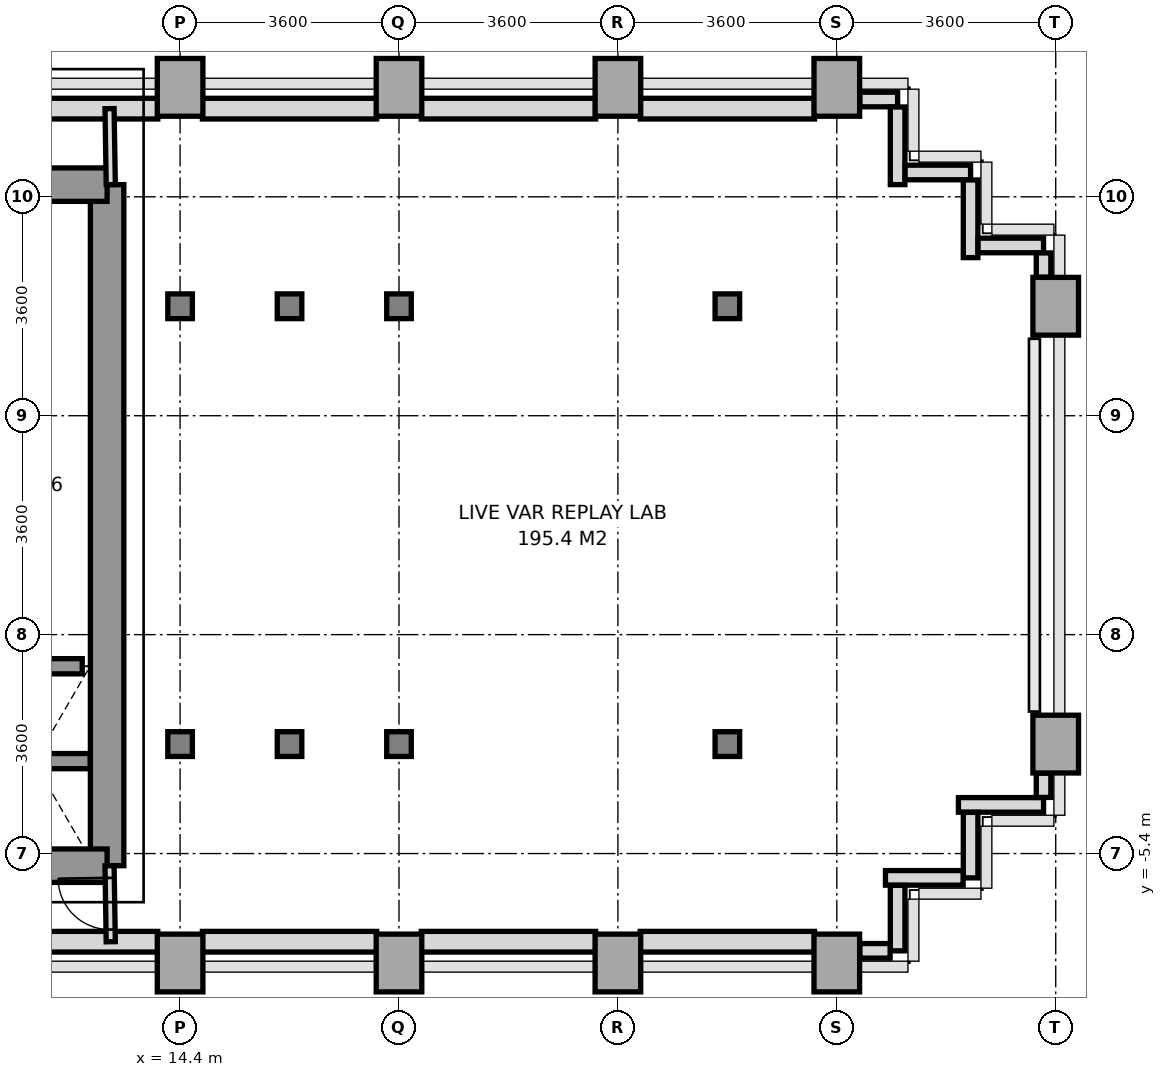
"""IFC4 building model, lengths in metres.
Left out: names, types, materials, properties, quantities, classifications, styles, units other than length and angle.
Written with IfcOpenShell. Run it as: python <this file> out.ifc"""

import sys

from ifc_helpers import new_model, si_unit, direction, frame, frame_2d, origin, origin_2d, place, context, subcontext, project, spatial, rectangle, i_section, extrude, source, transform, mapped, element, fill, save


model = new_model("IFC4")
c1 = context("Model", 3, precision=1e-05, world=origin(), true_north=direction((0.0, 1.0)))
c2 = subcontext(c1, "Body", "Model", "MODEL_VIEW")
j1 = project(units=[si_unit("LENGTHUNIT", "METRE"), si_unit("PLANEANGLEUNIT", "RADIAN")], contexts=[c1])
p1 = place(None, origin())
s1 = spatial("IfcSite", under=j1, at=p1, CompositionType="ELEMENT")
p2 = place(p1, origin())
s2 = spatial("IfcBuilding", under=s1, at=p2, CompositionType="ELEMENT")
p3 = place(p2, frame((0.0, 0.0, 74.8)))
s3 = spatial("IfcBuildingStorey", under=s2, at=p3, CompositionType="ELEMENT", Elevation=74.8)
m1 = source(origin(), c2, "Body", "SweptSolid", [
    extrude(rectangle(XDim=0.75, YDim=0.95, at=origin_2d()), origin(), (0.0, 0.0, 1.0), 3.2),
])
p4 = place(p3, frame((14.4, -7.2, 0.0), z_axis=(0.0, 0.0, 1.0), x_axis=(1.0, 0.0, 0.0)))
e1 = element("IfcColumn", 1, at=p4, inside=s3, PredefinedType="COLUMN", context=c2, shape_type="MappedRepresentation", body=[
    mapped(m1, transform((0.0, 0.0, 0.0), x_axis=(1.0, 0.0, 0.0), y_axis=(0.0, 1.0, 0.0), z_axis=(0.0, 0.0, 1.0), scale=1.0)),
])
m2 = source(origin(), c2, "Body", "SweptSolid", [
    extrude(i_section(OverallWidth=0.404, OverallDepth=0.407, WebThickness=0.022, FlangeThickness=0.035, at=origin_2d()), origin(), (0.0, 0.0, 1.0), 3.2),
])
for number, where, z_axis, x_axis in (
    (2, (14.4, -3.6, 0.0), (0.0, 0.0, 1.0), (1.0, 0.0, 0.0)),
    (3, (14.4, 3.6, 0.0), (0.0, 0.0, 1.0), (1.0, 0.0, 0.0)),
):
    element("IfcColumn", number, at=place(p3, frame(where, z_axis=z_axis, x_axis=x_axis)), inside=s3, PredefinedType="COLUMN", context=c2, shape_type="MappedRepresentation", body=[
        mapped(m2, transform((0.0, 0.0, 0.0), x_axis=(1.0, 0.0, 0.0), y_axis=(0.0, 1.0, 0.0), z_axis=(0.0, 0.0, 1.0), scale=1.0)),
    ])
p5 = place(p3, frame((14.4, 7.2, 0.0), z_axis=(0.0, 0.0, 1.0), x_axis=(1.0, 0.0, 0.0)))
e4 = element("IfcColumn", 4, at=p5, inside=s3, PredefinedType="COLUMN", context=c2, shape_type="MappedRepresentation", body=[
    mapped(m1, transform((0.0, 0.0, 0.0), x_axis=(1.0, 0.0, 0.0), y_axis=(0.0, 1.0, 0.0), z_axis=(0.0, 0.0, 1.0), scale=1.0)),
])
for number, where, z_axis, x_axis in (
    (5, (16.2, -3.6, 0.0), (0.0, 0.0, 1.0), (1.0, 0.0, 0.0)),
    (6, (16.2, 3.6, 0.0), (0.0, 0.0, 1.0), (1.0, 0.0, 0.0)),
):
    element("IfcColumn", number, at=place(p3, frame(where, z_axis=z_axis, x_axis=x_axis)), inside=s3, PredefinedType="COLUMN", context=c2, shape_type="MappedRepresentation", body=[
        mapped(m2, transform((0.0, 0.0, 0.0), x_axis=(1.0, 0.0, 0.0), y_axis=(0.0, 1.0, 0.0), z_axis=(0.0, 0.0, 1.0), scale=1.0)),
    ])
p6 = place(p3, frame((18.0, -7.2, 0.0), z_axis=(0.0, 0.0, 1.0), x_axis=(1.0, 0.0, 0.0)))
e7 = element("IfcColumn", 7, at=p6, inside=s3, PredefinedType="COLUMN", context=c2, shape_type="MappedRepresentation", body=[
    mapped(m1, transform((0.0, 0.0, 0.0), x_axis=(1.0, 0.0, 0.0), y_axis=(0.0, 1.0, 0.0), z_axis=(0.0, 0.0, 1.0), scale=1.0)),
])
for number, where, z_axis, x_axis in (
    (8, (18.0, -3.6, 0.0), (0.0, 0.0, 1.0), (1.0, 0.0, 0.0)),
    (9, (18.0, 3.6, 0.0), (0.0, 0.0, 1.0), (1.0, 0.0, 0.0)),
):
    element("IfcColumn", number, at=place(p3, frame(where, z_axis=z_axis, x_axis=x_axis)), inside=s3, PredefinedType="COLUMN", context=c2, shape_type="MappedRepresentation", body=[
        mapped(m2, transform((0.0, 0.0, 0.0), x_axis=(1.0, 0.0, 0.0), y_axis=(0.0, 1.0, 0.0), z_axis=(0.0, 0.0, 1.0), scale=1.0)),
    ])
for number, where, z_axis, x_axis in (
    (10, (18.0, 7.2, 0.0), (0.0, 0.0, 1.0), (1.0, 0.0, 0.0)),
    (11, (21.6, -7.2, 0.0), (0.0, 0.0, 1.0), (1.0, 0.0, 0.0)),
    (12, (21.6, 7.2, 0.0), (0.0, 0.0, 1.0), (1.0, 0.0, 0.0)),
):
    element("IfcColumn", number, at=place(p3, frame(where, z_axis=z_axis, x_axis=x_axis)), inside=s3, PredefinedType="COLUMN", context=c2, shape_type="MappedRepresentation", body=[
        mapped(m1, transform((0.0, 0.0, 0.0), x_axis=(1.0, 0.0, 0.0), y_axis=(0.0, 1.0, 0.0), z_axis=(0.0, 0.0, 1.0), scale=1.0)),
    ])
for number, where, z_axis, x_axis in (
    (13, (23.4, -3.6, 0.0), (0.0, 0.0, 1.0), (1.0, 0.0, 0.0)),
    (14, (23.4, 3.6, 0.0), (0.0, 0.0, 1.0), (1.0, 0.0, 0.0)),
):
    element("IfcColumn", number, at=place(p3, frame(where, z_axis=z_axis, x_axis=x_axis)), inside=s3, PredefinedType="COLUMN", context=c2, shape_type="MappedRepresentation", body=[
        mapped(m2, transform((0.0, 0.0, 0.0), x_axis=(1.0, 0.0, 0.0), y_axis=(0.0, 1.0, 0.0), z_axis=(0.0, 0.0, 1.0), scale=1.0)),
    ])
for number, where, z_axis, x_axis in (
    (15, (25.2, -7.2, 0.0), (0.0, 0.0, 1.0), (1.0, 0.0, 0.0)),
    (16, (25.2, 7.2, 0.0), (0.0, 0.0, 1.0), (1.0, 0.0, 0.0)),
    (17, (28.8, -3.6, 0.0), (0.0, 0.0, 1.0), (1.0, 0.0, 0.0)),
    (18, (28.8, 3.6, 0.0), (0.0, 0.0, 1.0), (1.0, 0.0, 0.0)),
):
    element("IfcColumn", number, at=place(p3, frame(where, z_axis=z_axis, x_axis=x_axis)), inside=s3, PredefinedType="COLUMN", context=c2, shape_type="MappedRepresentation", body=[
        mapped(m1, transform((0.0, 0.0, 0.0), x_axis=(1.0, 0.0, 0.0), y_axis=(0.0, 1.0, 0.0), z_axis=(0.0, 0.0, 1.0), scale=1.0)),
    ])
p7 = place(p3, frame((11.498, 6.85, 0.0), z_axis=(0.0, 0.0, 1.0), x_axis=(1.0, 0.0, 0.0)))
e19 = element("IfcWall", 19, at=p7, inside=s3, PredefinedType="SOLIDWALL", context=c2, shape_type="SweptSolid", body=[
    extrude(rectangle(XDim=2.535, YDim=0.34, at=frame_2d((1.268, 0.0))), origin(), (0.0, 0.0, 1.0), 3.2),
])
for number, where, z_axis, x_axis in (
    (20, (14.767, 6.85, 0.0), (0.0, 0.0, 1.0), (1.0, 0.0, 0.0)),
    (21, (18.367, 6.85, 0.0), (0.0, 0.0, 1.0), (1.0, 0.0, 0.0)),
    (22, (21.967, 6.85, 0.0), (0.0, 0.0, 1.0), (1.0, 0.0, 0.0)),
):
    element("IfcWall", number, at=place(p3, frame(where, z_axis=z_axis, x_axis=x_axis)), inside=s3, PredefinedType="SOLIDWALL", context=c2, shape_type="SweptSolid", body=[
        extrude(rectangle(XDim=2.866, YDim=0.34, at=frame_2d((1.433, 0.0))), origin(), (0.0, 0.0, 1.0), 2.45),
    ])
p8 = place(p3, frame((11.75, -6.85, 0.0), z_axis=(0.0, 0.0, 1.0), x_axis=(1.0, 0.0, 0.0)))
e23 = element("IfcWall", 23, at=p8, inside=s3, PredefinedType="SOLIDWALL", context=c2, shape_type="SweptSolid", body=[
    extrude(rectangle(XDim=2.283, YDim=0.34, at=frame_2d((1.142, 0.0))), origin(), (0.0, 0.0, 1.0), 3.2),
])
for number, where, z_axis, x_axis in (
    (24, (14.767, -6.85, 0.0), (0.0, 0.0, 1.0), (1.0, 0.0, 0.0)),
    (25, (18.367, -6.85, 0.0), (0.0, 0.0, 1.0), (1.0, 0.0, 0.0)),
    (26, (21.967, -6.85, 0.0), (0.0, 0.0, 1.0), (1.0, 0.0, 0.0)),
):
    element("IfcWall", number, at=place(p3, frame(where, z_axis=z_axis, x_axis=x_axis)), inside=s3, PredefinedType="SOLIDWALL", context=c2, shape_type="SweptSolid", body=[
        extrude(rectangle(XDim=2.866, YDim=0.34, at=frame_2d((1.433, 0.0))), origin(), (0.0, 0.0, 1.0), 2.45),
    ])
p9 = place(p3, frame((28.6, -4.6, 0.0), z_axis=(0.0, 0.0, 1.0), x_axis=(-1.0, 0.0, 0.0)))
e27 = element("IfcWall", 27, at=p9, inside=s3, PredefinedType="PARAPET", context=c2, shape_type="SweptSolid", body=[
    extrude(rectangle(XDim=1.4, YDim=0.24, at=frame_2d((0.7, 0.0))), origin(), (0.0, 0.0, 1.0), 1.15),
])
p10 = place(p3, frame((27.4, -4.723, 0.0), z_axis=(0.0, 0.0, 1.0), x_axis=(0.0, -1.0, 0.0)))
e28 = element("IfcWall", 28, at=p10, inside=s3, PredefinedType="PARAPET", context=c2, shape_type="SweptSolid", body=[
    extrude(rectangle(XDim=1.077, YDim=0.24, at=frame_2d((0.539, 0.0))), origin(), (0.0, 0.0, 1.0), 1.15),
])
p11 = place(p3, frame((27.277, -5.8, 0.0), z_axis=(0.0, 0.0, 1.0), x_axis=(-1.0, 0.0, 0.0)))
e29 = element("IfcWall", 29, at=p11, inside=s3, PredefinedType="PARAPET", context=c2, shape_type="SweptSolid", body=[
    extrude(rectangle(XDim=1.277, YDim=0.24, at=frame_2d((0.639, 0.0))), origin(), (0.0, 0.0, 1.0), 1.15),
])
p12 = place(p3, frame((26.2, -5.923, 0.0), z_axis=(0.0, 0.0, 1.0), x_axis=(0.0, -1.0, 0.0)))
e30 = element("IfcWall", 30, at=p12, inside=s3, PredefinedType="PARAPET", context=c2, shape_type="SweptSolid", body=[
    extrude(rectangle(XDim=1.077, YDim=0.24, at=frame_2d((0.539, 0.0))), origin(), (0.0, 0.0, 1.0), 1.15),
])
p13 = place(p3, frame((26.077, -7.0, 0.0), z_axis=(0.0, 0.0, 1.0), x_axis=(-1.0, 0.0, 0.0)))
e31 = element("IfcWall", 31, at=p13, inside=s3, PredefinedType="PARAPET", context=c2, shape_type="SweptSolid", body=[
    extrude(rectangle(XDim=0.499, YDim=0.24, at=frame_2d((0.25, 0.0))), origin(), (0.0, 0.0, 1.0), 1.15),
])
p14 = place(p3, frame((25.578, 7.0, 0.0), z_axis=(0.0, 0.0, 1.0), x_axis=(1.0, 0.0, 0.0)))
e32 = element("IfcWall", 32, at=p14, inside=s3, PredefinedType="PARAPET", context=c2, shape_type="SweptSolid", body=[
    extrude(rectangle(XDim=0.622, YDim=0.24, at=frame_2d((0.311, 0.0))), origin(), (0.0, 0.0, 1.0), 1.15),
])
p15 = place(p3, frame((26.2, 6.877, 0.0), z_axis=(0.0, 0.0, 1.0), x_axis=(0.0, -1.0, 0.0)))
e33 = element("IfcWall", 33, at=p15, inside=s3, PredefinedType="PARAPET", context=c2, shape_type="SweptSolid", body=[
    extrude(rectangle(XDim=1.277, YDim=0.24, at=frame_2d((0.638, 0.0))), origin(), (0.0, 0.0, 1.0), 1.15),
])
p16 = place(p3, frame((26.323, 5.8, 0.0), z_axis=(0.0, 0.0, 1.0), x_axis=(1.0, 0.0, 0.0)))
e34 = element("IfcWall", 34, at=p16, inside=s3, PredefinedType="PARAPET", context=c2, shape_type="SweptSolid", body=[
    extrude(rectangle(XDim=1.077, YDim=0.24, at=frame_2d((0.539, 0.0))), origin(), (0.0, 0.0, 1.0), 1.15),
])
p17 = place(p3, frame((27.4, 5.677, 0.0), z_axis=(0.0, 0.0, 1.0), x_axis=(0.0, -1.0, 0.0)))
e35 = element("IfcWall", 35, at=p17, inside=s3, PredefinedType="PARAPET", context=c2, shape_type="SweptSolid", body=[
    extrude(rectangle(XDim=1.277, YDim=0.24, at=frame_2d((0.639, 0.0))), origin(), (0.0, 0.0, 1.0), 1.15),
])
p18 = place(p3, frame((27.523, 4.6, 0.0), z_axis=(0.0, 0.0, 1.0), x_axis=(1.0, 0.0, 0.0)))
e36 = element("IfcWall", 36, at=p18, inside=s3, PredefinedType="PARAPET", context=c2, shape_type="SweptSolid", body=[
    extrude(rectangle(XDim=1.077, YDim=0.24, at=frame_2d((0.539, 0.0))), origin(), (0.0, 0.0, 1.0), 1.15),
])
for number, where, z_axis, x_axis in (
    (37, (28.6, 4.477, 0.0), (0.0, 0.0, 1.0), (0.0, -1.0, 0.0)),
    (38, (28.6, -4.078, 0.0), (0.0, 0.0, 1.0), (0.0, -1.0, 0.0)),
):
    element("IfcWall", number, at=place(p3, frame(where, z_axis=z_axis, x_axis=x_axis)), inside=s3, PredefinedType="PARAPET", context=c2, shape_type="SweptSolid", body=[
        extrude(rectangle(XDim=0.399, YDim=0.24, at=frame_2d((0.2, 0.0))), origin(), (0.0, 0.0, 1.0), 1.15),
    ])
p19 = place(p3, frame((13.2, -5.6, 0.0), z_axis=(0.0, 0.0, 1.0), x_axis=(0.0, 1.0, 0.0)))
e39 = element("IfcWall", 39, at=p19, inside=s3, PredefinedType="SHEAR", context=c2, shape_type="SweptSolid", body=[
    extrude(rectangle(XDim=11.2, YDim=0.55, at=frame_2d((5.6, 0.0))), origin(), (0.0, 0.0, 1.0), 3.2),
])
p20 = place(p3, frame((11.381, 5.6, 0.0), z_axis=(0.0, 0.0, 1.0), x_axis=(1.0, 0.0, 0.0)))
e40 = element("IfcWall", 40, at=p20, inside=s3, PredefinedType="SHEAR", context=c2, shape_type="SweptSolid", body=[
    extrude(rectangle(XDim=1.819, YDim=0.55, at=frame_2d((0.909, 0.0))), origin(), (0.0, 0.0, 1.0), 3.2),
])
p21 = place(p3, frame((5.4, -5.6, 0.0), z_axis=(0.0, 0.0, 1.0), x_axis=(1.0, 0.0, 0.0)))
e41 = element("IfcWall", 41, at=p21, inside=s3, PredefinedType="SHEAR", context=c2, shape_type="SweptSolid", body=[
    extrude(rectangle(XDim=7.8, YDim=0.55, at=frame_2d((3.9, 0.0))), origin(), (0.0, 0.0, 1.0), 3.2),
])
p22 = place(p21, frame((3.0, 0.0, 0.0)))
e42 = element("IfcOpeningElement", 42, at=p22, cuts=e41, PredefinedType="OPENING", context=c2, shape_type="SweptSolid", body=[
    extrude(rectangle(XDim=1.2, YDim=2.2, at=frame_2d((0.6, 1.1))), frame((0.0, 0.285, 0.0), z_axis=(0.0, -1.0, 0.0), x_axis=(1.0, 0.0, 0.0)), (0.0, 0.0, 1.0), 0.57),
])
p23 = place(p3, frame((11.08, -3.88, 0.0), z_axis=(0.0, 0.0, 1.0), x_axis=(1.0, 0.0, 0.0)))
e43 = element("IfcWall", 43, at=p23, inside=s3, PredefinedType="SOLIDWALL", context=c2, shape_type="SweptSolid", body=[
    extrude(rectangle(XDim=1.84, YDim=0.25, at=frame_2d((0.92, 0.0))), origin(), (0.0, 0.0, 1.0), 3.2),
])
p24 = place(p3, frame((11.209, -2.32, 0.0), z_axis=(0.0, 0.0, 1.0), x_axis=(1.0, 0.0, 0.0)))
e44 = element("IfcWall", 44, at=p24, inside=s3, PredefinedType="SOLIDWALL", context=c2, shape_type="SweptSolid", body=[
    extrude(rectangle(XDim=1.582, YDim=0.25, at=frame_2d((0.791, 0.0))), origin(), (0.0, 0.0, 1.0), 3.2),
])
p25 = place(p3, frame((13.26, 5.6, 0.0), z_axis=(0.0, 0.0, 1.0), x_axis=(-0.016013571389, 0.999871774545, 0.0)))
e45 = element("IfcWall", 45, at=p25, inside=s3, PredefinedType="PARTITIONING", context=c2, shape_type="SweptSolid", body=[
    extrude(rectangle(XDim=1.25, YDim=0.15, at=frame_2d((0.625, 0.0))), origin(), (0.0, 0.0, 1.0), 3.2),
])
p26 = place(p3, frame((13.26, -6.85, 0.0), z_axis=(0.0, 0.0, 1.0), x_axis=(-0.016013571389, 0.999871774545, 0.0)))
e46 = element("IfcWall", 46, at=p26, inside=s3, PredefinedType="PARTITIONING", context=c2, shape_type="SweptSolid", body=[
    extrude(rectangle(XDim=1.25, YDim=0.15, at=frame_2d((0.625, 0.0))), origin(), (0.0, 0.0, 1.0), 3.2),
])
p27 = place(p26, frame((0.2, 0.0, 0.0)))
e47 = element("IfcOpeningElement", 47, at=p27, cuts=e46, PredefinedType="OPENING", context=c2, shape_type="SweptSolid", body=[
    extrude(rectangle(XDim=0.85, YDim=2.1, at=frame_2d((0.425, 1.05))), frame((0.0, 0.085, 0.0), z_axis=(0.0, -1.0, 0.0), x_axis=(1.0, 0.0, 0.0)), (0.0, 0.0, 1.0), 0.17),
])
m3 = source(origin(), c2, "Body", "SweptSolid", [
    extrude(rectangle(XDim=0.85, YDim=2.1, at=frame_2d((0.425, 1.05))), frame((0.0, 0.025, 0.0), z_axis=(0.0, -1.0, 0.0), x_axis=(1.0, 0.0, 0.0)), (0.0, 0.0, 1.0), 0.05),
])
p28 = place(p27, origin())
e48 = element("IfcDoor", 48, at=p28, inside=s3, OperationType="SINGLE_SWING_RIGHT", PredefinedType="DOOR", context=c2, shape_type="MappedRepresentation", body=[
    mapped(m3, transform((0.0, 0.0, 0.0), x_axis=(1.0, 0.0, 0.0), y_axis=(0.0, 1.0, 0.0), z_axis=(0.0, 0.0, 1.0), scale=1.0)),
])
fill(e47, e48)
save(model, sys.argv[1])
